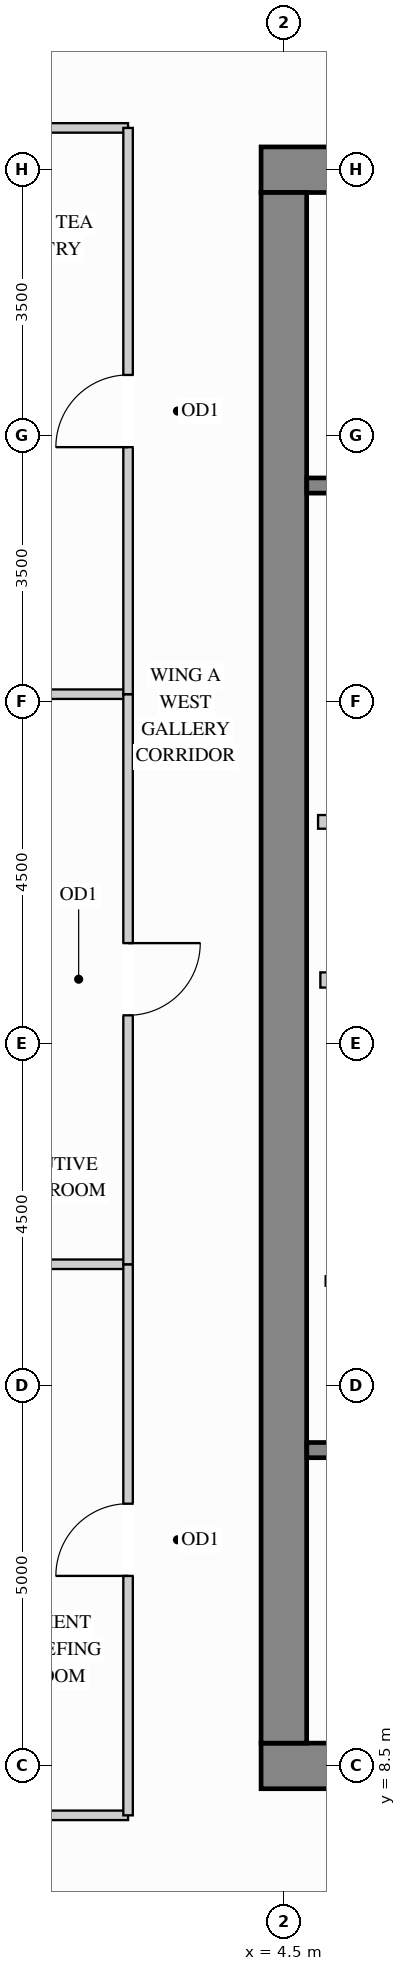
"""IFC4 building model, lengths in metres.
Left out: names, types, materials, properties, quantities, classifications, styles, units other than length and angle.
Written with IfcOpenShell. Run it as: python <this file> out.ifc"""

import sys

from ifc_helpers import new_model, si_unit, direction, frame, frame_2d, origin, place, context, subcontext, project, spatial, rectangle, extrude, source, transform, mapped, element, fill, save


model = new_model("IFC4")
c1 = context("Model", 3, precision=1e-05, world=origin(), true_north=direction((0.0, 1.0)))
c2 = subcontext(c1, "Body", "Model", "MODEL_VIEW")
j1 = project(units=[si_unit("LENGTHUNIT", "METRE"), si_unit("PLANEANGLEUNIT", "RADIAN")], contexts=[c1])
p1 = place(None, origin())
s1 = spatial("IfcSite", under=j1, at=p1, CompositionType="ELEMENT")
p2 = place(p1, origin())
s2 = spatial("IfcBuilding", under=s1, at=p2, CompositionType="ELEMENT")
p3 = place(p2, frame((0.0, 0.0, 146.7)))
s3 = spatial("IfcBuildingStorey", under=s2, at=p3, CompositionType="ELEMENT", Elevation=146.7)
m1 = source(origin(), c2, "Body", "SweptSolid", [
    extrude(rectangle(XDim=10.6, YDim=0.6, at=frame_2d((5.3, 0.0))), origin(), (0.0, 0.0, 1.0), 3.4),
])
for number, where, z_axis, x_axis in (
    (1, (4.2, 29.5, 0.0), (0.0, 0.0, 1.0), (1.0, 0.0, 0.0)),
    (2, (4.2, 8.5, 0.0), (0.0, 0.0, 1.0), (1.0, 0.0, 0.0)),
):
    element("IfcWall", number, at=place(p3, frame(where, z_axis=z_axis, x_axis=x_axis)), inside=s3, PredefinedType="SHEAR", context=c2, shape_type="MappedRepresentation", body=[
        mapped(m1, transform((0.0, 0.0, 0.0), x_axis=(1.0, 0.0, 0.0), y_axis=(0.0, 1.0, 0.0), z_axis=(0.0, 0.0, 1.0))),
    ])
m2 = source(origin(), c2, "Body", "SweptSolid", [
    extrude(rectangle(XDim=20.4, YDim=0.6, at=frame_2d((10.2, 0.0))), origin(), (0.0, 0.0, 1.0), 3.4),
])
p4 = place(p3, frame((4.5, 8.8, 0.0), z_axis=(0.0, 0.0, 1.0), x_axis=(0.0, 1.0, 0.0)))
e3 = element("IfcWall", 3, at=p4, inside=s3, PredefinedType="SHEAR", context=c2, shape_type="MappedRepresentation", body=[
    mapped(m2, transform((0.0, 0.0, 0.0), x_axis=(1.0, 0.0, 0.0), y_axis=(0.0, 1.0, 0.0), z_axis=(0.0, 0.0, 1.0))),
])
m3 = source(origin(), c2, "Body", "SweptSolid", [
    extrude(rectangle(XDim=2.2, YDim=0.18, at=frame_2d((1.1, 0.0))), origin(), (0.0, 0.0, 1.0), 3.385),
])
p5 = place(p3, frame((4.95, 20.92, 0.0), z_axis=(0.0, 0.0, 1.0), x_axis=(1.0, 0.0, 0.0)))
e4 = element("IfcWall", 4, at=p5, inside=s3, PredefinedType="PARTITIONING", context=c2, shape_type="MappedRepresentation", body=[
    mapped(m3, transform((0.0, 0.0, 0.0), x_axis=(1.0, 0.0, 0.0), y_axis=(0.0, 1.0, 0.0), z_axis=(0.0, 0.0, 1.0))),
])
p6 = place(p3, frame((5.05, 14.88, 0.0), z_axis=(0.0, 0.0, 1.0), x_axis=(1.0, 0.0, 0.0)))
e5 = element("IfcWall", 5, at=p6, inside=s3, PredefinedType="PARTITIONING", context=c2, shape_type="SweptSolid", body=[
    extrude(rectangle(XDim=2.35, YDim=0.125, at=frame_2d((1.175, 0.0))), origin(), (0.0, 0.0, 1.0), 3.385),
])
p7 = place(p6, frame((0.7, 0.0, 0.0)))
e6 = element("IfcOpeningElement", 6, at=p7, cuts=e5, PredefinedType="OPENING", context=c2, shape_type="SweptSolid", body=[
    extrude(rectangle(XDim=0.85, YDim=2.1, at=frame_2d((0.425, 1.05))), frame((0.0, 0.073, 0.0), z_axis=(0.0, -1.0, 0.0), x_axis=(1.0, 0.0, 0.0)), (0.0, 0.0, 1.0), 0.145),
])
m4 = source(origin(), c2, "Body", "SweptSolid", [
    extrude(rectangle(XDim=1.33, YDim=0.125, at=frame_2d((0.665, 0.0))), origin(), (0.0, 0.0, 1.0), 3.385),
])
p8 = place(p3, frame((1.12, 30.05, 0.0), z_axis=(0.0, 0.0, 1.0), x_axis=(1.0, 0.0, 0.0)))
e7 = element("IfcWall", 7, at=p8, inside=s3, PredefinedType="PARTITIONING", context=c2, shape_type="MappedRepresentation", body=[
    mapped(m4, transform((0.0, 0.0, 0.0), x_axis=(1.0, 0.0, 0.0), y_axis=(0.0, 1.0, 0.0), z_axis=(0.0, 0.0, 1.0))),
])
m5 = source(origin(), c2, "Body", "SweptSolid", [
    extrude(rectangle(XDim=2.098, YDim=0.125, at=frame_2d((1.049, 0.0))), origin(), (0.0, 0.0, 1.0), 3.385),
])
for number, where, z_axis, x_axis in (
    (8, (0.352, 7.85, 0.0), (0.0, 0.0, 1.0), (1.0, 0.0, 0.0)),
    (9, (0.352, 15.1, 0.0), (0.0, 0.0, 1.0), (1.0, 0.0, 0.0)),
):
    element("IfcWall", number, at=place(p3, frame(where, z_axis=z_axis, x_axis=x_axis)), inside=s3, PredefinedType="PARTITIONING", context=c2, shape_type="MappedRepresentation", body=[
        mapped(m5, transform((0.0, 0.0, 0.0), x_axis=(1.0, 0.0, 0.0), y_axis=(0.0, 1.0, 0.0), z_axis=(0.0, 0.0, 1.0))),
    ])
p9 = place(p3, frame((1.12, 22.6, 0.0), z_axis=(0.0, 0.0, 1.0), x_axis=(1.0, 0.0, 0.0)))
e10 = element("IfcWall", 10, at=p9, inside=s3, PredefinedType="PARTITIONING", context=c2, shape_type="MappedRepresentation", body=[
    mapped(m4, transform((0.0, 0.0, 0.0), x_axis=(1.0, 0.0, 0.0), y_axis=(0.0, 1.0, 0.0), z_axis=(0.0, 0.0, 1.0))),
])
p10 = place(p3, frame((2.45, 7.85, 0.0), z_axis=(0.0, 0.0, 1.0), x_axis=(0.0, 1.0, 0.0)))
e11 = element("IfcWall", 11, at=p10, inside=s3, PredefinedType="PARTITIONING", context=c2, shape_type="SweptSolid", body=[
    extrude(rectangle(XDim=7.25, YDim=0.125, at=frame_2d((3.625, 0.0))), origin(), (0.0, 0.0, 1.0), 3.385),
])
p11 = place(p10, frame((3.15, 0.0, 0.0)))
e12 = element("IfcOpeningElement", 12, at=p11, cuts=e11, PredefinedType="OPENING", context=c2, shape_type="SweptSolid", body=[
    extrude(rectangle(XDim=0.95, YDim=2.15, at=frame_2d((0.475, 1.075))), frame((0.0, 0.073, 0.0), z_axis=(0.0, -1.0, 0.0), x_axis=(1.0, 0.0, 0.0)), (0.0, 0.0, 1.0), 0.145),
])
p12 = place(p3, frame((2.45, 15.1, 0.0), z_axis=(0.0, 0.0, 1.0), x_axis=(0.0, 1.0, 0.0)))
e13 = element("IfcWall", 13, at=p12, inside=s3, PredefinedType="PARTITIONING", context=c2, shape_type="SweptSolid", body=[
    extrude(rectangle(XDim=7.5, YDim=0.125, at=frame_2d((3.75, 0.0))), origin(), (0.0, 0.0, 1.0), 3.385),
])
p13 = place(p12, frame((3.275, 0.0, 0.0)))
e14 = element("IfcOpeningElement", 14, at=p13, cuts=e13, PredefinedType="OPENING", context=c2, shape_type="SweptSolid", body=[
    extrude(rectangle(XDim=0.95, YDim=2.15, at=frame_2d((0.475, 1.075))), frame((0.0, 0.073, 0.0), z_axis=(0.0, -1.0, 0.0), x_axis=(1.0, 0.0, 0.0)), (0.0, 0.0, 1.0), 0.145),
])
p14 = place(p3, frame((2.45, 22.6, 0.0), z_axis=(0.0, 0.0, 1.0), x_axis=(0.0, 1.0, 0.0)))
e15 = element("IfcWall", 15, at=p14, inside=s3, PredefinedType="PARTITIONING", context=c2, shape_type="SweptSolid", body=[
    extrude(rectangle(XDim=7.45, YDim=0.125, at=frame_2d((3.725, 0.0))), origin(), (0.0, 0.0, 1.0), 3.385),
])
p15 = place(p14, frame((3.25, 0.0, 0.0)))
e16 = element("IfcOpeningElement", 16, at=p15, cuts=e15, PredefinedType="OPENING", context=c2, shape_type="SweptSolid", body=[
    extrude(rectangle(XDim=0.95, YDim=2.15, at=frame_2d((0.475, 1.075))), frame((0.0, 0.073, 0.0), z_axis=(0.0, -1.0, 0.0), x_axis=(1.0, 0.0, 0.0)), (0.0, 0.0, 1.0), 0.145),
])
m6 = source(origin(), c2, "Body", "SweptSolid", [
    extrude(rectangle(XDim=2.09, YDim=0.2, at=frame_2d((1.045, 0.0))), origin(), (0.0, 0.0, 1.0), 3.385),
])
p16 = place(p3, frame((4.98, 18.84, 0.0), z_axis=(0.0, 0.0, 1.0), x_axis=(1.0, 0.0, 0.0)))
e17 = element("IfcWall", 17, at=p16, inside=s3, PredefinedType="PARTITIONING", context=c2, shape_type="MappedRepresentation", body=[
    mapped(m6, transform((0.0, 0.0, 0.0), x_axis=(1.0, 0.0, 0.0), y_axis=(0.0, 1.0, 0.0), z_axis=(0.0, 0.0, 1.0))),
])
p17 = place(p3, frame((4.802, 12.655, 0.0), z_axis=(0.0, 0.0, 1.0), x_axis=(1.0, 0.0, 0.0)))
e18 = element("IfcWall", 18, at=p17, inside=s3, PredefinedType="SHEAR", context=c2, shape_type="SweptSolid", body=[
    extrude(rectangle(XDim=7.603, YDim=0.2, at=frame_2d((3.802, 0.0))), origin(), (0.0, 0.0, 1.0), 3.4),
])
p18 = place(p17, frame((0.4, 0.0, 0.0)))
e19 = element("IfcOpeningElement", 19, at=p18, cuts=e18, PredefinedType="OPENING", context=c2, shape_type="SweptSolid", body=[
    extrude(rectangle(XDim=1.1, YDim=2.15, at=frame_2d((0.55, 1.075))), frame((0.0, 0.11, 0.0), z_axis=(0.0, -1.0, 0.0), x_axis=(1.0, 0.0, 0.0)), (0.0, 0.0, 1.0), 0.22),
])
p19 = place(p3, frame((4.802, 25.345, 0.0), z_axis=(0.0, 0.0, 1.0), x_axis=(1.0, 0.0, 0.0)))
e20 = element("IfcWall", 20, at=p19, inside=s3, PredefinedType="SHEAR", context=c2, shape_type="SweptSolid", body=[
    extrude(rectangle(XDim=7.603, YDim=0.2, at=frame_2d((3.802, 0.0))), origin(), (0.0, 0.0, 1.0), 3.4),
])
p20 = place(p19, frame((0.4, 0.0, 0.0)))
e21 = element("IfcOpeningElement", 21, at=p20, cuts=e20, PredefinedType="OPENING", context=c2, shape_type="SweptSolid", body=[
    extrude(rectangle(XDim=1.1, YDim=2.15, at=frame_2d((0.55, 1.075))), frame((0.0, 0.11, 0.0), z_axis=(0.0, -1.0, 0.0), x_axis=(1.0, 0.0, 0.0)), (0.0, 0.0, 1.0), 0.22),
])
m7 = source(origin(), c2, "Body", "SweptSolid", [
    extrude(rectangle(XDim=0.95, YDim=2.15, at=frame_2d((0.475, 1.075))), frame((0.0, 0.025, 0.0), z_axis=(0.0, -1.0, 0.0), x_axis=(1.0, 0.0, 0.0)), (0.0, 0.0, 1.0), 0.05),
])
p21 = place(p11, origin())
e22 = element("IfcDoor", 22, at=p21, inside=s3, OperationType="SINGLE_SWING_LEFT", PredefinedType="DOOR", context=c2, shape_type="MappedRepresentation", body=[
    mapped(m7, transform((0.0, 0.0, 0.0), x_axis=(1.0, 0.0, 0.0), y_axis=(0.0, 1.0, 0.0), z_axis=(0.0, 0.0, 1.0))),
])
fill(e12, e22)
p22 = place(p13, origin())
e23 = element("IfcDoor", 23, at=p22, inside=s3, OperationType="SINGLE_SWING_RIGHT", PredefinedType="DOOR", context=c2, shape_type="MappedRepresentation", body=[
    mapped(m7, transform((0.0, 0.0, 0.0), x_axis=(1.0, 0.0, 0.0), y_axis=(0.0, 1.0, 0.0), z_axis=(0.0, 0.0, 1.0))),
])
fill(e14, e23)
p23 = place(p15, origin())
e24 = element("IfcDoor", 24, at=p23, inside=s3, OperationType="SINGLE_SWING_LEFT", PredefinedType="DOOR", context=c2, shape_type="MappedRepresentation", body=[
    mapped(m7, transform((0.0, 0.0, 0.0), x_axis=(1.0, 0.0, 0.0), y_axis=(0.0, 1.0, 0.0), z_axis=(0.0, 0.0, 1.0))),
])
fill(e16, e24)
save(model, sys.argv[1])
